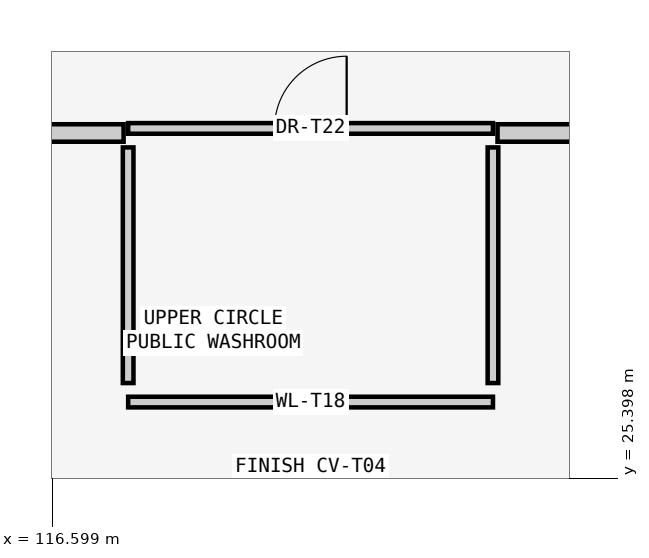
"""IFC4 building model, lengths in metres.
Left out: names, types, materials, properties, quantities, classifications, styles, units other than length and angle.
Written with IfcOpenShell. Run it as: python <this file> out.ifc"""

import sys

from ifc_helpers import new_model, si_unit, direction, frame, frame_2d, origin, place, context, subcontext, project, spatial, rectangle, extrude, element, fill, save


model = new_model("IFC4")
c1 = context("Model", 3, precision=1e-05, world=origin(), true_north=direction((0.0, 1.0)))
c2 = subcontext(c1, "Body", "Model", "MODEL_VIEW")
j1 = project(units=[si_unit("LENGTHUNIT", "METRE"), si_unit("PLANEANGLEUNIT", "RADIAN")], contexts=[c1])
p1 = place(None, origin())
s1 = spatial("IfcSite", under=j1, at=p1, CompositionType="ELEMENT")
p2 = place(p1, origin())
s2 = spatial("IfcBuilding", under=s1, at=p2, CompositionType="ELEMENT")
p3 = place(p2, frame((0.0, 0.0, 15.0)))
s3 = spatial("IfcBuildingStorey", under=s2, at=p3, CompositionType="ELEMENT", Elevation=15.0)
p4 = place(p3, frame((117.6, 26.4, 0.0), z_axis=(0.0, 0.0, 1.0), x_axis=(1.0, 0.0, 0.0)))
e1 = element("IfcWall", 1, at=p4, inside=s3, PredefinedType="PARTITIONING", context=c2, shape_type="SweptSolid", body=[
    extrude(rectangle(XDim=4.8, YDim=0.14, at=frame_2d((2.4, 0.0))), origin(), (0.0, 0.0, 1.0), 4.32),
])
p5 = place(p3, frame((117.6, 30.0, 0.0), z_axis=(0.0, 0.0, 1.0), x_axis=(1.0, 0.0, 0.0)))
e2 = element("IfcWall", 2, at=p5, inside=s3, PredefinedType="PARTITIONING", context=c2, shape_type="SweptSolid", body=[
    extrude(rectangle(XDim=4.8, YDim=0.14, at=frame_2d((2.4, 0.0))), origin(), (0.0, 0.0, 1.0), 4.32),
])
p6 = place(p5, frame((1.925, 0.0, 0.0)))
e3 = element("IfcOpeningElement", 3, at=p6, cuts=e2, PredefinedType="OPENING", context=c2, shape_type="SweptSolid", body=[
    extrude(rectangle(XDim=0.95, YDim=2.15, at=frame_2d((0.475, 1.075))), frame((0.0, 0.08, 0.0), z_axis=(0.0, -1.0, 0.0), x_axis=(1.0, 0.0, 0.0)), (0.0, 0.0, 1.0), 0.16),
])
for number, where, z_axis, x_axis in (
    (4, (117.6, 26.65, 0.0), (0.0, 0.0, 1.0), (0.0, 1.0, 0.0)),
    (5, (122.4, 26.65, 0.0), (0.0, 0.0, 1.0), (0.0, 1.0, 0.0)),
):
    element("IfcWall", number, at=place(p3, frame(where, z_axis=z_axis, x_axis=x_axis)), inside=s3, PredefinedType="PARTITIONING", context=c2, shape_type="SweptSolid", body=[
        extrude(rectangle(XDim=3.1, YDim=0.14, at=frame_2d((1.55, 0.0))), origin(), (0.0, 0.0, 1.0), 4.32),
    ])
p7 = place(p3, frame((122.46, 29.94, 0.0), z_axis=(0.0, 0.0, 1.0), x_axis=(1.0, 0.0, 0.0)))
e6 = element("IfcWall", 6, at=p7, inside=s3, PredefinedType="SOLIDWALL", context=c2, shape_type="SweptSolid", body=[
    extrude(rectangle(XDim=2.54, YDim=0.23, at=frame_2d((1.27, 0.0))), origin(), (0.0, 0.0, 1.0), 4.45),
])
p8 = place(p3, frame((105.85, 29.94, 0.0), z_axis=(0.0, 0.0, 1.0), x_axis=(1.0, 0.0, 0.0)))
e7 = element("IfcWall", 7, at=p8, inside=s3, PredefinedType="SOLIDWALL", context=c2, shape_type="SweptSolid", body=[
    extrude(rectangle(XDim=11.69, YDim=0.23, at=frame_2d((5.845, 0.0))), origin(), (0.0, 0.0, 1.0), 4.45),
])
p9 = place(p8, frame((4.945, 0.0, 0.0)))
e8 = element("IfcOpeningElement", 8, at=p9, cuts=e7, PredefinedType="OPENING", context=c2, shape_type="SweptSolid", body=[
    extrude(rectangle(XDim=1.8, YDim=2.3, at=frame_2d((0.9, 1.15))), frame((0.0, 0.125, 0.0), z_axis=(0.0, -1.0, 0.0), x_axis=(1.0, 0.0, 0.0)), (0.0, 0.0, 1.0), 0.25),
])
p10 = place(p6, origin())
e9 = element("IfcDoor", 9, at=p10, inside=s3, OperationType="SINGLE_SWING_RIGHT", PredefinedType="DOOR", context=c2, shape_type="SweptSolid", body=[
    extrude(rectangle(XDim=0.95, YDim=2.15, at=frame_2d((0.475, 1.075))), frame((0.0, 0.025, 0.0), z_axis=(0.0, -1.0, 0.0), x_axis=(1.0, 0.0, 0.0)), (0.0, 0.0, 1.0), 0.05),
])
fill(e3, e9)
save(model, sys.argv[1])
